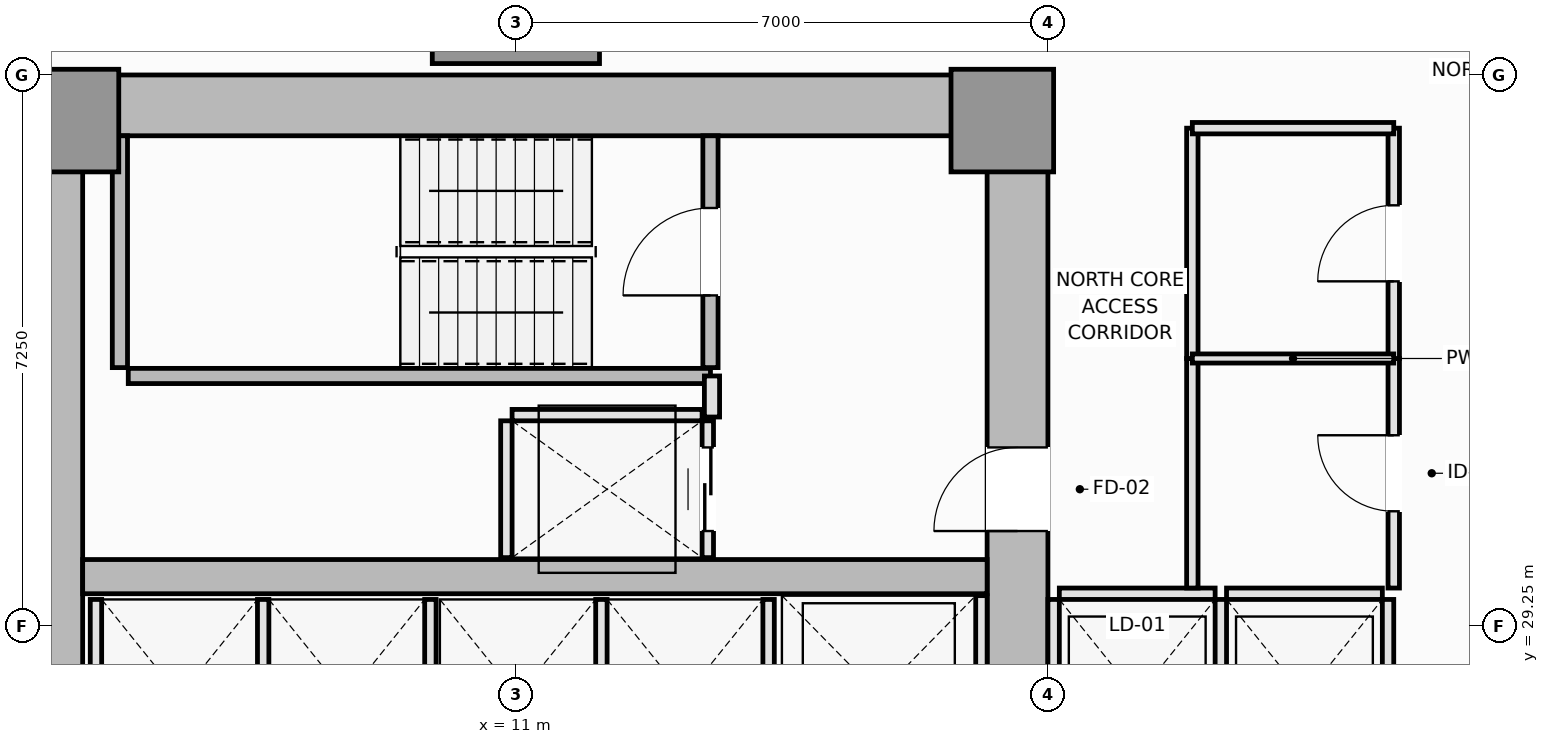
"""IFC4 building model, lengths in metres.
Left out: names, types, materials, properties, quantities, classifications, styles, units other than length and angle.
Written with IfcOpenShell. Run it as: python <this file> out.ifc"""

import sys

from ifc_helpers import new_model, si_unit, direction, frame, frame_2d, origin, origin_2d, place, context, subcontext, project, spatial, rectangle, extrude, element, fill, save


model = new_model("IFC4")
c1 = context("Model", 3, precision=1e-05, world=origin(), true_north=direction((0.0, 1.0)))
c2 = subcontext(c1, "Body", "Model", "MODEL_VIEW")
j1 = project(units=[si_unit("LENGTHUNIT", "METRE"), si_unit("PLANEANGLEUNIT", "RADIAN")], contexts=[c1])
p1 = place(None, origin())
s1 = spatial("IfcSite", under=j1, at=p1, CompositionType="ELEMENT")
p2 = place(p1, origin())
s2 = spatial("IfcBuilding", under=s1, at=p2, CompositionType="ELEMENT")
p3 = place(p2, frame((0.0, 0.0, 29.15)))
s3 = spatial("IfcBuildingStorey", under=s2, at=p3, CompositionType="ELEMENT", Elevation=29.15)
p4 = place(p3, frame((4.5, 36.1, 0.0), z_axis=(0.0, 0.0, 1.0), x_axis=(1.0, 0.0, 0.0)))
e1 = element("IfcWall", 1, at=p4, inside=s3, PredefinedType="SHEAR", context=c2, shape_type="SweptSolid", body=[
    extrude(rectangle(XDim=13.5, YDim=0.8, at=frame_2d((6.75, 0.0))), origin(), (0.0, 0.0, 1.0), 3.55),
])
p5 = place(p3, frame((4.9, 14.8, 0.0), z_axis=(0.0, 0.0, 1.0), x_axis=(0.0, 1.0, 0.0)))
e2 = element("IfcWall", 2, at=p5, inside=s3, PredefinedType="SHEAR", context=c2, shape_type="SweptSolid", body=[
    extrude(rectangle(XDim=20.9, YDim=0.8, at=frame_2d((10.45, 0.0))), origin(), (0.0, 0.0, 1.0), 3.55),
])
p6 = place(p3, frame((17.6, 27.05, 0.0), z_axis=(0.0, 0.0, 1.0), x_axis=(0.0, 1.0, 0.0)))
e3 = element("IfcWall", 3, at=p6, inside=s3, PredefinedType="SHEAR", context=c2, shape_type="SweptSolid", body=[
    extrude(rectangle(XDim=8.65, YDim=0.8, at=frame_2d((4.325, 0.0))), origin(), (0.0, 0.0, 1.0), 3.55),
])
p7 = place(p6, frame((3.45, 0.0, 0.0)))
e4 = element("IfcOpeningElement", 4, at=p7, cuts=e3, PredefinedType="OPENING", context=c2, shape_type="SweptSolid", body=[
    extrude(rectangle(XDim=1.1, YDim=2.15, at=frame_2d((0.55, 1.075))), frame((0.0, 0.41, 0.0), z_axis=(0.0, -1.0, 0.0), x_axis=(1.0, 0.0, 0.0)), (0.0, 0.0, 1.0), 0.82),
])
p8 = place(p3, frame((5.3, 29.9, 0.0), z_axis=(0.0, 0.0, 1.0), x_axis=(1.0, 0.0, 0.0)))
e5 = element("IfcWall", 5, at=p8, inside=s3, PredefinedType="SHEAR", context=c2, shape_type="SweptSolid", body=[
    extrude(rectangle(XDim=11.9, YDim=0.45, at=frame_2d((5.95, 0.0))), origin(), (0.0, 0.0, 1.0), 3.55),
])
for number, where, z_axis, x_axis in (
    (6, (5.1, 35.9, 0.0), (0.0, 0.0, 1.0), (1.0, 0.0, 0.0)),
    (7, (17.4, 35.9, 0.0), (0.0, 0.0, 1.0), (1.0, 0.0, 0.0)),
):
    element("IfcColumn", number, at=place(p3, frame(where, z_axis=z_axis, x_axis=x_axis)), inside=s3, PredefinedType="PILASTER", context=c2, shape_type="SweptSolid", body=[
        extrude(rectangle(XDim=1.35, YDim=1.35, at=origin_2d()), origin(), (0.0, 0.0, 1.0), 3.55),
    ])
p9 = place(p3, frame((11.0, 37.75, 0.0), z_axis=(0.0, 0.0, 1.0), x_axis=(1.0, 0.0, 0.0)))
e8 = element("IfcColumn", 8, at=p9, inside=s3, PredefinedType="COLUMN", context=c2, shape_type="SweptSolid", body=[
    extrude(rectangle(XDim=2.2, YDim=2.2, at=origin_2d()), origin(), (0.0, 0.0, 1.0), 3.55),
])
p10 = place(p3, frame((5.79, 32.65, 0.0), z_axis=(0.0, 0.0, 1.0), x_axis=(0.0, 1.0, 0.0)))
e9 = element("IfcWall", 9, at=p10, inside=s3, PredefinedType="SOLIDWALL", context=c2, shape_type="SweptSolid", body=[
    extrude(rectangle(XDim=3.05, YDim=0.2, at=frame_2d((1.525, 0.0))), origin(), (0.0, 0.0, 1.0), 3.55),
])
p11 = place(p3, frame((5.9, 32.54, 0.0), z_axis=(0.0, 0.0, 1.0), x_axis=(1.0, 0.0, 0.0)))
e10 = element("IfcWall", 10, at=p11, inside=s3, PredefinedType="SOLIDWALL", context=c2, shape_type="SweptSolid", body=[
    extrude(rectangle(XDim=7.66, YDim=0.2, at=frame_2d((3.83, 0.0))), origin(), (0.0, 0.0, 1.0), 3.55),
])
p12 = place(p3, frame((13.56, 32.65, 0.0), z_axis=(0.0, 0.0, 1.0), x_axis=(0.0, 1.0, 0.0)))
e11 = element("IfcWall", 11, at=p12, inside=s3, PredefinedType="SOLIDWALL", context=c2, shape_type="SweptSolid", body=[
    extrude(rectangle(XDim=3.05, YDim=0.2, at=frame_2d((1.525, 0.0))), origin(), (0.0, 0.0, 1.0), 3.55),
])
p13 = place(p12, frame((0.95, 0.0, 0.0)))
e12 = element("IfcOpeningElement", 12, at=p13, cuts=e11, PredefinedType="OPENING", context=c2, shape_type="SweptSolid", body=[
    extrude(rectangle(XDim=1.15, YDim=2.15, at=frame_2d((0.575, 1.075))), frame((0.0, 0.11, 0.0), z_axis=(0.0, -1.0, 0.0), x_axis=(1.0, 0.0, 0.0)), (0.0, 0.0, 1.0), 0.22),
])
p14 = place(p3, frame((18.15, 29.675, 0.0), z_axis=(0.0, 0.0, 1.0), x_axis=(1.0, 0.0, 0.0)))
e13 = element("IfcWall", 13, at=p14, inside=s3, PredefinedType="PARTITIONING", context=c2, shape_type="SweptSolid", body=[
    extrude(rectangle(XDim=2.05, YDim=0.15, at=frame_2d((1.025, 0.0))), origin(), (0.0, 0.0, 1.0), 3.37),
])
for number, where, z_axis, x_axis in (
    (14, (18.075, 27.05, 0.0), (0.0, 0.0, 1.0), (0.0, 1.0, 0.0)),
    (15, (20.275, 27.05, 0.0), (0.0, 0.0, 1.0), (0.0, 1.0, 0.0)),
):
    element("IfcWall", number, at=place(p3, frame(where, z_axis=z_axis, x_axis=x_axis)), inside=s3, PredefinedType="PARTITIONING", context=c2, shape_type="SweptSolid", body=[
        extrude(rectangle(XDim=2.55, YDim=0.15, at=frame_2d((1.275, 0.0))), origin(), (0.0, 0.0, 1.0), 3.37),
    ])
p15 = place(p3, frame((20.35, 29.675, 0.0), z_axis=(0.0, 0.0, 1.0), x_axis=(1.0, 0.0, 0.0)))
e16 = element("IfcWall", 16, at=p15, inside=s3, PredefinedType="PARTITIONING", context=c2, shape_type="SweptSolid", body=[
    extrude(rectangle(XDim=2.05, YDim=0.15, at=frame_2d((1.025, 0.0))), origin(), (0.0, 0.0, 1.0), 3.37),
])
for number, where, z_axis, x_axis in (
    (17, (22.475, 27.05, 0.0), (0.0, 0.0, 1.0), (0.0, 1.0, 0.0)),
    (18, (5.475, 27.05, 0.0), (0.0, 0.0, 1.0), (0.0, 1.0, 0.0)),
    (19, (7.675, 27.05, 0.0), (0.0, 0.0, 1.0), (0.0, 1.0, 0.0)),
    (20, (9.875, 27.05, 0.0), (0.0, 0.0, 1.0), (0.0, 1.0, 0.0)),
    (21, (12.125, 27.05, 0.0), (0.0, 0.0, 1.0), (0.0, 1.0, 0.0)),
    (22, (14.325, 27.05, 0.0), (0.0, 0.0, 1.0), (0.0, 1.0, 0.0)),
):
    element("IfcWall", number, at=place(p3, frame(where, z_axis=z_axis, x_axis=x_axis)), inside=s3, PredefinedType="PARTITIONING", context=c2, shape_type="SweptSolid", body=[
        extrude(rectangle(XDim=2.55, YDim=0.15, at=frame_2d((1.275, 0.0))), origin(), (0.0, 0.0, 1.0), 3.37),
    ])
p16 = place(p3, frame((17.125, 27.05, 0.0), z_axis=(0.0, 0.0, 1.0), x_axis=(0.0, 1.0, 0.0)))
e23 = element("IfcWall", 23, at=p16, inside=s3, PredefinedType="PARTITIONING", context=c2, shape_type="SweptSolid", body=[
    extrude(rectangle(XDim=2.6, YDim=0.15, at=frame_2d((1.3, 0.0))), origin(), (0.0, 0.0, 1.0), 3.37),
])
p17 = place(p3, frame((10.95, 32.025, 0.0), z_axis=(0.0, 0.0, 1.0), x_axis=(1.0, 0.0, 0.0)))
e24 = element("IfcWall", 24, at=p17, inside=s3, PredefinedType="PARTITIONING", context=c2, shape_type="SweptSolid", body=[
    extrude(rectangle(XDim=2.5, YDim=0.15, at=frame_2d((1.25, 0.0))), origin(), (0.0, 0.0, 1.0), 3.37),
])
p18 = place(p3, frame((10.875, 30.15, 0.0), z_axis=(0.0, 0.0, 1.0), x_axis=(0.0, 1.0, 0.0)))
e25 = element("IfcWall", 25, at=p18, inside=s3, PredefinedType="PARTITIONING", context=c2, shape_type="SweptSolid", body=[
    extrude(rectangle(XDim=1.8, YDim=0.15, at=frame_2d((0.9, 0.0))), origin(), (0.0, 0.0, 1.0), 3.37),
])
p19 = place(p3, frame((13.525, 30.15, 0.0), z_axis=(0.0, 0.0, 1.0), x_axis=(0.0, 1.0, 0.0)))
e26 = element("IfcWall", 26, at=p19, inside=s3, PredefinedType="PARTITIONING", context=c2, shape_type="SweptSolid", body=[
    extrude(rectangle(XDim=1.8, YDim=0.15, at=frame_2d((0.9, 0.0))), origin(), (0.0, 0.0, 1.0), 3.37),
])
p20 = place(p19, frame((0.35, 0.0, 0.0)))
e27 = element("IfcOpeningElement", 27, at=p20, cuts=e26, PredefinedType="OPENING", context=c2, shape_type="SweptSolid", body=[
    extrude(rectangle(XDim=1.1, YDim=2.2, at=frame_2d((0.55, 1.1))), frame((0.0, 0.085, 0.0), z_axis=(0.0, -1.0, 0.0), x_axis=(1.0, 0.0, 0.0)), (0.0, 0.0, 1.0), 0.17),
])
p21 = place(p3, frame((13.58, 32.0, 0.0), z_axis=(0.0, 0.0, 1.0), x_axis=(0.0, 1.0, 0.0)))
e28 = element("IfcWall", 28, at=p21, inside=s3, PredefinedType="PARTITIONING", context=c2, shape_type="SweptSolid", body=[
    extrude(rectangle(XDim=0.54, YDim=0.2, at=frame_2d((0.27, 0.0))), origin(), (0.0, 0.0, 1.0), 3.37),
])
p22 = place(p3, frame((22.55, 29.75, 0.0), z_axis=(0.0, 0.0, 1.0), x_axis=(0.0, 1.0, 0.0)))
e29 = element("IfcWall", 29, at=p22, inside=s3, PredefinedType="PARTITIONING", context=c2, shape_type="SweptSolid", body=[
    extrude(rectangle(XDim=3.02, YDim=0.15, at=frame_2d((1.51, 0.0))), origin(), (0.0, 0.0, 1.0), 3.01),
])
p23 = place(p22, frame((1.01, 0.0, 0.0)))
e30 = element("IfcOpeningElement", 30, at=p23, cuts=e29, PredefinedType="OPENING", context=c2, shape_type="SweptSolid", body=[
    extrude(rectangle(XDim=1.0, YDim=2.15, at=frame_2d((0.5, 1.075))), frame((0.0, 0.085, 0.0), z_axis=(0.0, -1.0, 0.0), x_axis=(1.0, 0.0, 0.0)), (0.0, 0.0, 1.0), 0.17),
])
p24 = place(p3, frame((22.55, 32.77, 0.0), z_axis=(0.0, 0.0, 1.0), x_axis=(0.0, 1.0, 0.0)))
e31 = element("IfcWall", 31, at=p24, inside=s3, PredefinedType="PARTITIONING", context=c2, shape_type="SweptSolid", body=[
    extrude(rectangle(XDim=3.03, YDim=0.15, at=frame_2d((1.515, 0.0))), origin(), (0.0, 0.0, 1.0), 3.01),
])
p25 = place(p24, frame((1.015, 0.0, 0.0)))
e32 = element("IfcOpeningElement", 32, at=p25, cuts=e31, PredefinedType="OPENING", context=c2, shape_type="SweptSolid", body=[
    extrude(rectangle(XDim=1.0, YDim=2.15, at=frame_2d((0.5, 1.075))), frame((0.0, 0.085, 0.0), z_axis=(0.0, -1.0, 0.0), x_axis=(1.0, 0.0, 0.0)), (0.0, 0.0, 1.0), 0.17),
])
p26 = place(p3, frame((19.9, 29.75, 0.0), z_axis=(0.0, 0.0, 1.0), x_axis=(0.0, 1.0, 0.0)))
e33 = element("IfcWall", 33, at=p26, inside=s3, PredefinedType="PARTITIONING", context=c2, shape_type="SweptSolid", body=[
    extrude(rectangle(XDim=3.02, YDim=0.15, at=frame_2d((1.51, 0.0))), origin(), (0.0, 0.0, 1.0), 3.37),
])
p27 = place(p3, frame((19.9, 32.77, 0.0), z_axis=(0.0, 0.0, 1.0), x_axis=(0.0, 1.0, 0.0)))
e34 = element("IfcWall", 34, at=p27, inside=s3, PredefinedType="PARTITIONING", context=c2, shape_type="SweptSolid", body=[
    extrude(rectangle(XDim=3.03, YDim=0.15, at=frame_2d((1.515, 0.0))), origin(), (0.0, 0.0, 1.0), 3.37),
])
p28 = place(p3, frame((19.9, 35.8, 0.0), z_axis=(0.0, 0.0, 1.0), x_axis=(1.0, 0.0, 0.0)))
e35 = element("IfcWall", 35, at=p28, inside=s3, PredefinedType="PARTITIONING", context=c2, shape_type="SweptSolid", body=[
    extrude(rectangle(XDim=2.65, YDim=0.15, at=frame_2d((1.325, 0.0))), origin(), (0.0, 0.0, 1.0), 3.37),
])
p29 = place(p3, frame((19.9, 32.77, 0.0), z_axis=(0.0, 0.0, 1.0), x_axis=(1.0, 0.0, 0.0)))
e36 = element("IfcWall", 36, at=p29, inside=s3, PredefinedType="PARTITIONING", context=c2, shape_type="SweptSolid", body=[
    extrude(rectangle(XDim=2.65, YDim=0.12, at=frame_2d((1.325, 0.0))), origin(), (0.0, 0.0, 1.0), 3.37),
])
p30 = place(p13, origin())
e37 = element("IfcDoor", 37, at=p30, inside=s3, OperationType="SINGLE_SWING_LEFT", PredefinedType="DOOR", context=c2, shape_type="SweptSolid", body=[
    extrude(rectangle(XDim=1.15, YDim=2.15, at=frame_2d((0.575, 1.075))), frame((0.0, 0.025, 0.0), z_axis=(0.0, -1.0, 0.0), x_axis=(1.0, 0.0, 0.0)), (0.0, 0.0, 1.0), 0.05),
])
fill(e12, e37)
p31 = place(p20, origin())
e38 = element("IfcDoor", 38, at=p31, inside=s3, OperationType="DOUBLE_DOOR_SLIDING", PredefinedType="DOOR", context=c2, shape_type="SweptSolid", body=[
    extrude(rectangle(XDim=1.1, YDim=2.2, at=frame_2d((0.55, 1.1))), frame((0.0, 0.025, 0.0), z_axis=(0.0, -1.0, 0.0), x_axis=(1.0, 0.0, 0.0)), (0.0, 0.0, 1.0), 0.05),
])
fill(e27, e38)
p32 = place(p7, origin())
e39 = element("IfcDoor", 39, at=p32, inside=s3, OperationType="SINGLE_SWING_LEFT", PredefinedType="DOOR", context=c2, shape_type="SweptSolid", body=[
    extrude(rectangle(XDim=1.1, YDim=2.15, at=frame_2d((0.55, 1.075))), frame((0.0, 0.025, 0.0), z_axis=(0.0, -1.0, 0.0), x_axis=(1.0, 0.0, 0.0)), (0.0, 0.0, 1.0), 0.05),
])
fill(e4, e39)
p33 = place(p23, origin())
e40 = element("IfcDoor", 40, at=p33, inside=s3, OperationType="SINGLE_SWING_RIGHT", PredefinedType="DOOR", context=c2, shape_type="SweptSolid", body=[
    extrude(rectangle(XDim=1.0, YDim=2.15, at=frame_2d((0.5, 1.075))), frame((0.0, 0.025, 0.0), z_axis=(0.0, -1.0, 0.0), x_axis=(1.0, 0.0, 0.0)), (0.0, 0.0, 1.0), 0.05),
])
fill(e30, e40)
p34 = place(p25, origin())
e41 = element("IfcDoor", 41, at=p34, inside=s3, OperationType="SINGLE_SWING_LEFT", PredefinedType="DOOR", context=c2, shape_type="SweptSolid", body=[
    extrude(rectangle(XDim=1.0, YDim=2.15, at=frame_2d((0.5, 1.075))), frame((0.0, 0.025, 0.0), z_axis=(0.0, -1.0, 0.0), x_axis=(1.0, 0.0, 0.0)), (0.0, 0.0, 1.0), 0.05),
])
fill(e32, e41)
save(model, sys.argv[1])
